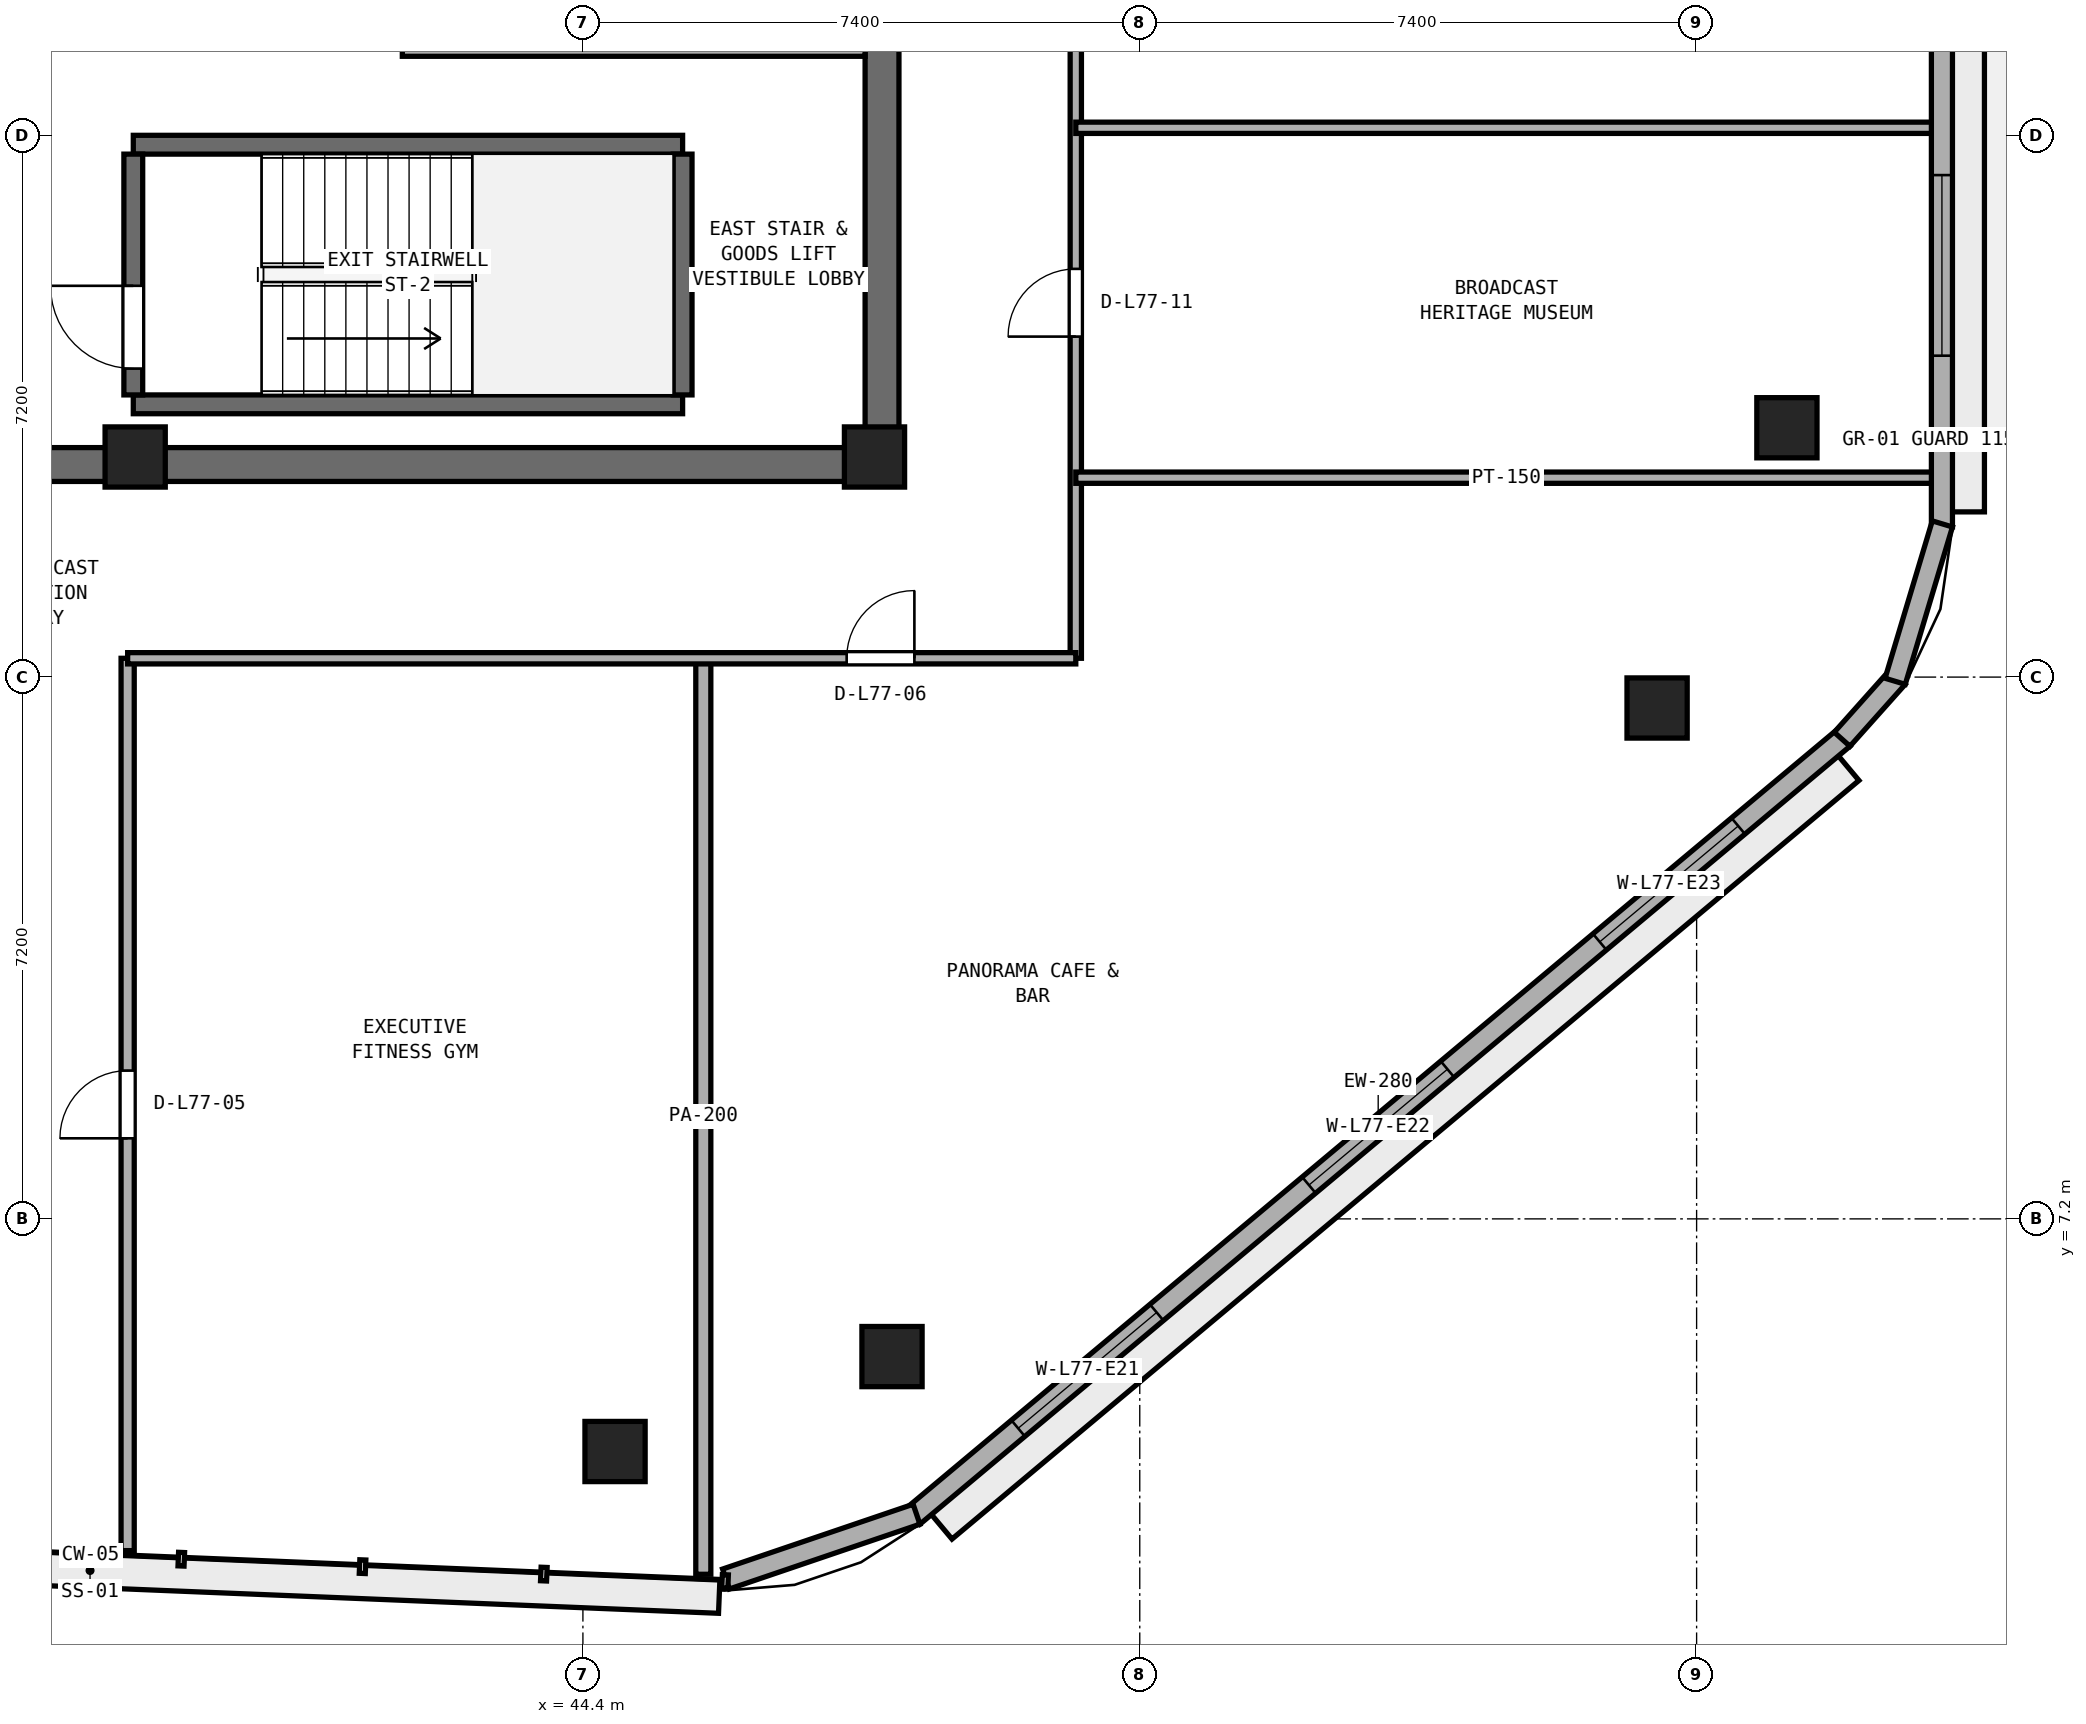
"""IFC4 building model, lengths in metres.
Left out: names, types, materials, properties, quantities, classifications, styles, units other than length and angle.
Written with IfcOpenShell. Run it as: python <this file> out.ifc"""

import sys

from ifc_helpers import new_model, si_unit, direction, frame, frame_2d, origin, origin_2d, place, context, subcontext, project, spatial, rectangle, extrude, element, fill, save


model = new_model("IFC4")
c1 = context("Model", 3, precision=1e-05, world=origin(), true_north=direction((0.0, 1.0)))
c2 = subcontext(c1, "Body", "Model", "MODEL_VIEW")
j1 = project(units=[si_unit("LENGTHUNIT", "METRE"), si_unit("PLANEANGLEUNIT", "RADIAN")], contexts=[c1])
p1 = place(None, origin())
s1 = spatial("IfcSite", under=j1, at=p1, CompositionType="ELEMENT")
p2 = place(p1, origin())
s2 = spatial("IfcBuilding", under=s1, at=p2, CompositionType="ELEMENT")
p3 = place(p2, frame((0.0, 0.0, 301.0)))
s3 = spatial("IfcBuildingStorey", under=s2, at=p3, CompositionType="ELEMENT", Elevation=301.0)
p4 = place(p3, frame((25.4, 17.225, 0.0), z_axis=(0.0, 0.0, 1.0), x_axis=(1.0, 0.0, 0.0)))
e1 = element("IfcWall", 1, at=p4, inside=s3, PredefinedType="SHEAR", context=c2, shape_type="SweptSolid", body=[
    extrude(rectangle(XDim=23.2, YDim=0.45, at=frame_2d((11.6, 0.0))), origin(), (0.0, 0.0, 1.0), 3.54),
])
p5 = place(p3, frame((48.375, 17.45, 0.0), z_axis=(0.0, 0.0, 1.0), x_axis=(0.0, 1.0, 0.0)))
e2 = element("IfcWall", 2, at=p5, inside=s3, PredefinedType="SHEAR", context=c2, shape_type="SweptSolid", body=[
    extrude(rectangle(XDim=15.5, YDim=0.45, at=frame_2d((7.75, 0.0))), origin(), (0.0, 0.0, 1.0), 3.54),
])
p6 = place(p5, frame((5.85, 0.0, 0.0)))
e3 = element("IfcOpeningElement", 3, at=p6, cuts=e2, PredefinedType="OPENING", context=c2, shape_type="SweptSolid", body=[
    extrude(rectangle(XDim=1.5, YDim=2.15, at=frame_2d((0.75, 1.075))), frame((0.0, 0.235, 0.0), z_axis=(0.0, -1.0, 0.0), x_axis=(1.0, 0.0, 0.0)), (0.0, 0.0, 1.0), 0.47),
])
for number, where, z_axis, x_axis in (
    (4, (38.45, 17.325, 0.0), (0.0, 0.0, 1.0), (1.0, 0.0, 0.0)),
    (5, (48.275, 17.325, 0.0), (0.0, 0.0, 1.0), (1.0, 0.0, 0.0)),
):
    element("IfcColumn", number, at=place(p3, frame(where, z_axis=z_axis, x_axis=x_axis)), inside=s3, PredefinedType="PILASTER", context=c2, shape_type="SweptSolid", body=[
        extrude(rectangle(XDim=0.8, YDim=0.8, at=origin_2d()), origin(), (0.0, 0.0, 1.0), 3.8),
    ])
for number, where, z_axis, x_axis in (
    (6, (44.827, 4.108, 0.0), (0.0, 0.0, 1.0), (1.0, 0.0, 0.0)),
    (7, (48.508, 5.37, 0.0), (0.0, 0.0, 1.0), (1.0, 0.0, 0.0)),
    (8, (58.675, 13.989, 0.0), (0.0, 0.0, 1.0), (1.0, 0.0, 0.0)),
    (9, (60.4, 17.714, 0.0), (0.0, 0.0, 1.0), (1.0, 0.0, 0.0)),
):
    element("IfcColumn", number, at=place(p3, frame(where, z_axis=z_axis, x_axis=x_axis)), inside=s3, PredefinedType="COLUMN", context=c2, shape_type="SweptSolid", body=[
        extrude(rectangle(XDim=0.8, YDim=0.8, at=origin_2d()), origin(), (0.0, 0.0, 1.0), 3.8),
    ])
for number, where, z_axis, x_axis in (
    (10, (38.425, 18.025, 0.0), (0.0, 0.0, 1.0), (1.0, 0.0, 0.0)),
    (11, (38.425, 21.475, 0.0), (0.0, 0.0, 1.0), (1.0, 0.0, 0.0)),
):
    element("IfcWall", number, at=place(p3, frame(where, z_axis=z_axis, x_axis=x_axis)), inside=s3, PredefinedType="SHEAR", context=c2, shape_type="SweptSolid", body=[
        extrude(rectangle(XDim=7.3, YDim=0.25, at=frame_2d((3.65, 0.0))), origin(), (0.0, 0.0, 1.0), 3.54),
    ])
p7 = place(p3, frame((38.425, 18.15, 0.0), z_axis=(0.0, 0.0, 1.0), x_axis=(0.0, 1.0, 0.0)))
e12 = element("IfcWall", 12, at=p7, inside=s3, PredefinedType="SHEAR", context=c2, shape_type="SweptSolid", body=[
    extrude(rectangle(XDim=3.2, YDim=0.25, at=frame_2d((1.6, 0.0))), origin(), (0.0, 0.0, 1.0), 3.54),
])
p8 = place(p7, frame((0.35, 0.0, 0.0)))
e13 = element("IfcOpeningElement", 13, at=p8, cuts=e12, PredefinedType="OPENING", context=c2, shape_type="SweptSolid", body=[
    extrude(rectangle(XDim=1.1, YDim=2.15, at=frame_2d((0.55, 1.075))), frame((0.0, 0.135, 0.0), z_axis=(0.0, -1.0, 0.0), x_axis=(1.0, 0.0, 0.0)), (0.0, 0.0, 1.0), 0.27),
])
p9 = place(p3, frame((45.725, 18.15, 0.0), z_axis=(0.0, 0.0, 1.0), x_axis=(0.0, 1.0, 0.0)))
e14 = element("IfcWall", 14, at=p9, inside=s3, PredefinedType="SHEAR", context=c2, shape_type="SweptSolid", body=[
    extrude(rectangle(XDim=3.2, YDim=0.25, at=frame_2d((1.6, 0.0))), origin(), (0.0, 0.0, 1.0), 3.54),
])
p10 = place(p3, frame((42.0, 22.75, 0.0), z_axis=(0.0, 0.0, 1.0), x_axis=(1.0, 0.0, 0.0)))
e15 = element("IfcWall", 15, at=p10, inside=s3, PredefinedType="SOLIDWALL", context=c2, shape_type="SweptSolid", body=[
    extrude(rectangle(XDim=6.15, YDim=0.2, at=frame_2d((3.075, 0.0))), origin(), (0.0, 0.0, 1.0), 3.54),
])
p11 = place(p3, frame((50.95, 14.65, 0.0), z_axis=(0.0, 0.0, 1.0), x_axis=(0.0, 1.0, 0.0)))
e16 = element("IfcWall", 16, at=p11, inside=s3, PredefinedType="PARTITIONING", context=c2, shape_type="SweptSolid", body=[
    extrude(rectangle(XDim=13.15, YDim=0.15, at=frame_2d((6.575, 0.0))), origin(), (0.0, 0.0, 1.0), 3.54),
])
p12 = place(p11, frame((4.275, 0.0, 0.0)))
e17 = element("IfcOpeningElement", 17, at=p12, cuts=e16, PredefinedType="OPENING", context=c2, shape_type="SweptSolid", body=[
    extrude(rectangle(XDim=0.9, YDim=2.1, at=frame_2d((0.45, 1.05))), frame((0.0, 0.085, 0.0), z_axis=(0.0, -1.0, 0.0), x_axis=(1.0, 0.0, 0.0)), (0.0, 0.0, 1.0), 0.17),
])
p13 = place(p11, frame((9.53, 0.0, 0.0)))
e18 = element("IfcOpeningElement", 18, at=p13, cuts=e16, PredefinedType="OPENING", context=c2, shape_type="SweptSolid", body=[
    extrude(rectangle(XDim=0.9, YDim=2.1, at=frame_2d((0.45, 1.05))), frame((0.0, 0.085, 0.0), z_axis=(0.0, -1.0, 0.0), x_axis=(1.0, 0.0, 0.0)), (0.0, 0.0, 1.0), 0.17),
])
p14 = place(p3, frame((46.0, 2.477, 0.0), z_axis=(0.0, 0.0, 1.0), x_axis=(0.0, 1.0, 0.0)))
e19 = element("IfcWall", 19, at=p14, inside=s3, PredefinedType="PARTITIONING", context=c2, shape_type="SweptSolid", body=[
    extrude(rectangle(XDim=12.173, YDim=0.2, at=frame_2d((6.086, 0.0))), origin(), (0.0, 0.0, 1.0), 3.54),
])
p15 = place(p3, frame((38.35, 2.792, 0.0), z_axis=(0.0, 0.0, 1.0), x_axis=(0.0, 1.0, 0.0)))
e20 = element("IfcWall", 20, at=p15, inside=s3, PredefinedType="PARTITIONING", context=c2, shape_type="SweptSolid", body=[
    extrude(rectangle(XDim=11.858, YDim=0.175, at=frame_2d((5.929, 0.0))), origin(), (0.0, 0.0, 1.0), 3.54),
])
p16 = place(p15, frame((5.479, 0.0, 0.0)))
e21 = element("IfcOpeningElement", 21, at=p16, cuts=e20, PredefinedType="OPENING", context=c2, shape_type="SweptSolid", body=[
    extrude(rectangle(XDim=0.9, YDim=2.1, at=frame_2d((0.45, 1.05))), frame((0.0, 0.097, 0.0), z_axis=(0.0, -1.0, 0.0), x_axis=(1.0, 0.0, 0.0)), (0.0, 0.0, 1.0), 0.195),
])
p17 = place(p3, frame((38.35, 14.65, 0.0), z_axis=(0.0, 0.0, 1.0), x_axis=(1.0, 0.0, 0.0)))
e22 = element("IfcWall", 22, at=p17, inside=s3, PredefinedType="PARTITIONING", context=c2, shape_type="SweptSolid", body=[
    extrude(rectangle(XDim=12.6, YDim=0.15, at=frame_2d((6.3, 0.0))), origin(), (0.0, 0.0, 1.0), 3.54),
])
p18 = place(p17, frame((9.555, 0.0, 0.0)))
e23 = element("IfcOpeningElement", 23, at=p18, cuts=e22, PredefinedType="OPENING", context=c2, shape_type="SweptSolid", body=[
    extrude(rectangle(XDim=0.9, YDim=2.1, at=frame_2d((0.45, 1.05))), frame((0.0, 0.085, 0.0), z_axis=(0.0, -1.0, 0.0), x_axis=(1.0, 0.0, 0.0)), (0.0, 0.0, 1.0), 0.17),
])
for number, where, z_axis, x_axis in (
    (24, (50.95, 17.05, 0.0), (0.0, 0.0, 1.0), (1.0, 0.0, 0.0)),
    (25, (50.95, 21.7, 0.0), (0.0, 0.0, 1.0), (1.0, 0.0, 0.0)),
):
    element("IfcWall", number, at=place(p3, frame(where, z_axis=z_axis, x_axis=x_axis)), inside=s3, PredefinedType="PARTITIONING", context=c2, shape_type="SweptSolid", body=[
        extrude(rectangle(XDim=11.445, YDim=0.15, at=frame_2d((5.723, 0.0))), origin(), (0.0, 0.0, 1.0), 3.54),
    ])
p19 = place(p3, frame((48.789, 3.25, 0.0), z_axis=(0.0, 0.0, 1.0), x_axis=(0.767032672101, 0.641608042288, 0.0)))
e26 = element("IfcWall", 26, at=p19, inside=s3, PredefinedType="STANDARD", context=c2, shape_type="SweptSolid", body=[
    extrude(rectangle(XDim=16.113, YDim=0.28, at=frame_2d((8.057, 0.0))), origin(), (0.0, 0.0, 1.0), 3.54),
])
p20 = place(p19, frame((1.819, 0.0, 0.9)))
e27 = element("IfcOpeningElement", 27, at=p20, cuts=e26, PredefinedType="OPENING", context=c2, shape_type="SweptSolid", body=[
    extrude(rectangle(XDim=2.4, YDim=1.75, at=frame_2d((1.2, 0.875))), frame((0.0, 0.15, 0.0), z_axis=(0.0, -1.0, 0.0), x_axis=(1.0, 0.0, 0.0)), (0.0, 0.0, 1.0), 0.3),
])
p21 = place(p19, frame((6.857, 0.0, 0.9)))
e28 = element("IfcOpeningElement", 28, at=p21, cuts=e26, PredefinedType="OPENING", context=c2, shape_type="SweptSolid", body=[
    extrude(rectangle(XDim=2.4, YDim=1.75, at=frame_2d((1.2, 0.875))), frame((0.0, 0.15, 0.0), z_axis=(0.0, -1.0, 0.0), x_axis=(1.0, 0.0, 0.0)), (0.0, 0.0, 1.0), 0.3),
])
p22 = place(p19, frame((11.895, 0.0, 0.9)))
e29 = element("IfcOpeningElement", 29, at=p22, cuts=e26, PredefinedType="OPENING", context=c2, shape_type="SweptSolid", body=[
    extrude(rectangle(XDim=2.4, YDim=1.75, at=frame_2d((1.2, 0.875))), frame((0.0, 0.15, 0.0), z_axis=(0.0, -1.0, 0.0), x_axis=(1.0, 0.0, 0.0)), (0.0, 0.0, 1.0), 0.3),
])
p23 = place(p3, frame((62.46, 16.396, 0.0), z_axis=(0.0, 0.0, 1.0), x_axis=(0.0, 1.0, 0.0)))
e30 = element("IfcWall", 30, at=p23, inside=s3, PredefinedType="STANDARD", context=c2, shape_type="SweptSolid", body=[
    extrude(rectangle(XDim=18.854, YDim=0.28, at=frame_2d((9.427, 0.0))), origin(), (0.0, 0.0, 1.0), 3.54),
])
p24 = place(p23, frame((8.877, 0.0, 0.0)))
e31 = element("IfcOpeningElement", 31, at=p24, cuts=e30, PredefinedType="OPENING", context=c2, shape_type="SweptSolid", body=[
    extrude(rectangle(XDim=1.1, YDim=2.2, at=frame_2d((0.55, 1.1))), frame((0.0, 0.15, 0.0), z_axis=(0.0, -1.0, 0.0), x_axis=(1.0, 0.0, 0.0)), (0.0, 0.0, 1.0), 0.3),
])
p25 = place(p23, frame((2.276, 0.0, 0.9)))
e32 = element("IfcOpeningElement", 32, at=p25, cuts=e30, PredefinedType="OPENING", context=c2, shape_type="SweptSolid", body=[
    extrude(rectangle(XDim=2.4, YDim=1.75, at=frame_2d((1.2, 0.875))), frame((0.0, 0.15, 0.0), z_axis=(0.0, -1.0, 0.0), x_axis=(1.0, 0.0, 0.0)), (0.0, 0.0, 1.0), 0.3),
])
p26 = place(p23, frame((14.179, 0.0, 0.9)))
e33 = element("IfcOpeningElement", 33, at=p26, cuts=e30, PredefinedType="OPENING", context=c2, shape_type="SweptSolid", body=[
    extrude(rectangle(XDim=2.4, YDim=1.75, at=frame_2d((1.2, 0.875))), frame((0.0, 0.15, 0.0), z_axis=(0.0, -1.0, 0.0), x_axis=(1.0, 0.0, 0.0)), (0.0, 0.0, 1.0), 0.3),
])
p27 = place(p3, frame((46.301, 2.414, 0.0), z_axis=(0.0, 0.0, 1.0), x_axis=(0.946767737654, 0.321917459819, 0.0)))
e34 = element("IfcWall", 34, at=p27, inside=s3, PredefinedType="STANDARD", context=c2, shape_type="SweptSolid", body=[
    extrude(rectangle(XDim=2.675, YDim=0.28, at=frame_2d((1.337, 0.0))), origin(), (0.0, 0.0, 1.0), 3.54),
])
p28 = place(p3, frame((61.134, 13.574, 0.0), z_axis=(0.0, 0.0, 1.0), x_axis=(0.665804679247, 0.74612608123, 0.0)))
e35 = element("IfcWall", 35, at=p28, inside=s3, PredefinedType="STANDARD", context=c2, shape_type="SweptSolid", body=[
    extrude(rectangle(XDim=1.103, YDim=0.28, at=frame_2d((0.552, 0.0))), origin(), (0.0, 0.0, 1.0), 3.54),
])
p29 = place(p3, frame((61.839, 14.344, 0.0), z_axis=(0.0, 0.0, 1.0), x_axis=(0.287235049694, 0.957860128739, 0.0)))
e36 = element("IfcWall", 36, at=p29, inside=s3, PredefinedType="STANDARD", context=c2, shape_type="SweptSolid", body=[
    extrude(rectangle(XDim=2.184, YDim=0.28, at=frame_2d((1.092, 0.0))), origin(), (0.0, 0.0, 1.0), 3.54),
])
p30 = place(p8, origin())
e37 = element("IfcDoor", 37, at=p30, inside=s3, OperationType="SINGLE_SWING_RIGHT", PredefinedType="DOOR", context=c2, shape_type="SweptSolid", body=[
    extrude(rectangle(XDim=1.1, YDim=2.15, at=frame_2d((0.55, 1.075))), frame((0.0, 0.025, 0.0), z_axis=(0.0, -1.0, 0.0), x_axis=(1.0, 0.0, 0.0)), (0.0, 0.0, 1.0), 0.05),
])
fill(e13, e37)
p31 = place(p16, origin())
e38 = element("IfcDoor", 38, at=p31, inside=s3, OperationType="SINGLE_SWING_LEFT", PredefinedType="DOOR", context=c2, shape_type="SweptSolid", body=[
    extrude(rectangle(XDim=0.9, YDim=2.1, at=frame_2d((0.45, 1.05))), frame((0.0, 0.025, 0.0), z_axis=(0.0, -1.0, 0.0), x_axis=(1.0, 0.0, 0.0)), (0.0, 0.0, 1.0), 0.05),
])
fill(e21, e38)
p32 = place(p18, origin())
e39 = element("IfcDoor", 39, at=p32, inside=s3, OperationType="SINGLE_SWING_RIGHT", PredefinedType="DOOR", context=c2, shape_type="SweptSolid", body=[
    extrude(rectangle(XDim=0.9, YDim=2.1, at=frame_2d((0.45, 1.05))), frame((0.0, 0.025, 0.0), z_axis=(0.0, -1.0, 0.0), x_axis=(1.0, 0.0, 0.0)), (0.0, 0.0, 1.0), 0.05),
])
fill(e23, e39)
p33 = place(p12, origin())
e40 = element("IfcDoor", 40, at=p33, inside=s3, OperationType="SINGLE_SWING_LEFT", PredefinedType="DOOR", context=c2, shape_type="SweptSolid", body=[
    extrude(rectangle(XDim=0.9, YDim=2.1, at=frame_2d((0.45, 1.05))), frame((0.0, 0.025, 0.0), z_axis=(0.0, -1.0, 0.0), x_axis=(1.0, 0.0, 0.0)), (0.0, 0.0, 1.0), 0.05),
])
fill(e17, e40)
p34 = place(p20, origin())
e41 = element("IfcWindow", 41, at=p34, inside=s3, PartitioningType="SINGLE_PANEL", PredefinedType="WINDOW", context=c2, shape_type="SweptSolid", body=[
    extrude(rectangle(XDim=2.4, YDim=1.75, at=frame_2d((1.2, 0.875))), frame((0.0, 0.03, 0.0), z_axis=(0.0, -1.0, 0.0), x_axis=(1.0, 0.0, 0.0)), (0.0, 0.0, 1.0), 0.06),
])
fill(e27, e41)
p35 = place(p21, origin())
e42 = element("IfcWindow", 42, at=p35, inside=s3, PartitioningType="SINGLE_PANEL", PredefinedType="WINDOW", context=c2, shape_type="SweptSolid", body=[
    extrude(rectangle(XDim=2.4, YDim=1.75, at=frame_2d((1.2, 0.875))), frame((0.0, 0.03, 0.0), z_axis=(0.0, -1.0, 0.0), x_axis=(1.0, 0.0, 0.0)), (0.0, 0.0, 1.0), 0.06),
])
fill(e28, e42)
p36 = place(p22, origin())
e43 = element("IfcWindow", 43, at=p36, inside=s3, PartitioningType="SINGLE_PANEL", PredefinedType="WINDOW", context=c2, shape_type="SweptSolid", body=[
    extrude(rectangle(XDim=2.4, YDim=1.75, at=frame_2d((1.2, 0.875))), frame((0.0, 0.03, 0.0), z_axis=(0.0, -1.0, 0.0), x_axis=(1.0, 0.0, 0.0)), (0.0, 0.0, 1.0), 0.06),
])
fill(e29, e43)
p37 = place(p25, origin())
e44 = element("IfcWindow", 44, at=p37, inside=s3, PartitioningType="SINGLE_PANEL", PredefinedType="WINDOW", context=c2, shape_type="SweptSolid", body=[
    extrude(rectangle(XDim=2.4, YDim=1.75, at=frame_2d((1.2, 0.875))), frame((0.0, 0.03, 0.0), z_axis=(0.0, -1.0, 0.0), x_axis=(1.0, 0.0, 0.0)), (0.0, 0.0, 1.0), 0.06),
])
fill(e32, e44)
save(model, sys.argv[1])
